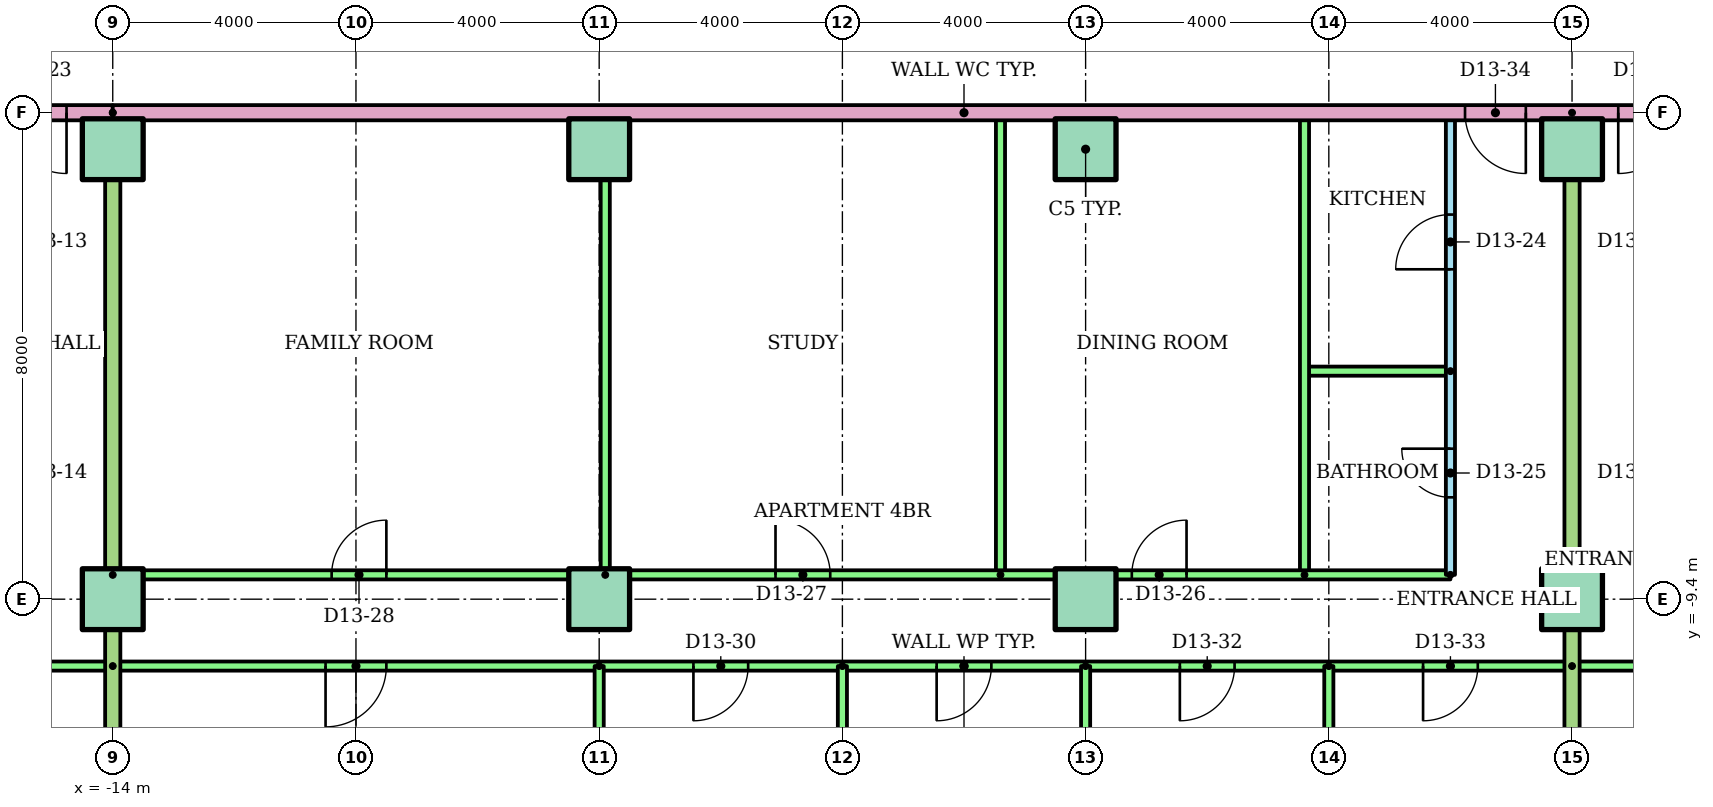
"""IFC4 building model, lengths in metres.
Left out: names, types, materials, properties, quantities, classifications, styles, units other than length and angle.
Written with IfcOpenShell. Run it as: python <this file> out.ifc"""

import sys

from ifc_helpers import new_model, si_unit, direction, frame, frame_2d, origin, origin_2d, place, context, subcontext, project, spatial, rectangle, extrude, element, fill, save


model = new_model("IFC4")
c1 = context("Model", 3, precision=1e-05, world=origin(), true_north=direction((0.0, 1.0)))
c2 = subcontext(c1, "Body", "Model", "MODEL_VIEW")
j1 = project(units=[si_unit("LENGTHUNIT", "METRE"), si_unit("PLANEANGLEUNIT", "RADIAN")], contexts=[c1])
p1 = place(None, origin())
s1 = spatial("IfcSite", under=j1, at=p1, CompositionType="ELEMENT")
p2 = place(p1, origin())
s2 = spatial("IfcBuilding", under=s1, at=p2, CompositionType="ELEMENT")
p3 = place(p2, frame((0.0, 0.0, 51.2)))
s3 = spatial("IfcBuildingStorey", under=s2, at=p3, CompositionType="ELEMENT", Elevation=51.2)
for number, where in (
    (1, (-14.0, -9.4, 0.0)),
    (2, (-6.0, -9.4, 0.0)),
    (3, (2.0, -9.4, 0.0)),
    (4, (10.0, -9.4, 0.0)),
    (5, (-14.0, -2.0, 0.0)),
    (6, (-6.0, -2.0, 0.0)),
    (7, (2.0, -2.0, 0.0)),
    (8, (10.0, -2.0, 0.0)),
):
    element("IfcColumn", number, at=place(p3, frame(where)), inside=s3, PredefinedType="COLUMN", context=c2, shape_type="SweptSolid", body=[
        extrude(rectangle(XDim=1.0, YDim=1.0, at=origin_2d()), origin(), (0.0, 0.0, 1.0), 3.2),
    ])
p4 = place(p3, frame((-14.0, -10.5, 0.0), z_axis=(0.0, 0.0, 1.0), x_axis=(-1.0, 0.0, 0.0)))
e9 = element("IfcWall", 9, at=p4, inside=s3, PredefinedType="PARTITIONING", context=c2, shape_type="SweptSolid", body=[
    extrude(rectangle(XDim=22.52, YDim=0.15, at=frame_2d((11.26, 0.0))), origin(), (0.0, 0.0, 1.0), 2.4),
])
p5 = place(p4, frame((19.6, 0.0, 0.0)))
e10 = element("IfcOpeningElement", 10, at=p5, cuts=e9, PredefinedType="OPENING", context=c2, shape_type="SweptSolid", body=[
    extrude(rectangle(XDim=0.9, YDim=2.1, at=frame_2d((0.45, 1.05))), frame((0.0, 0.085, 0.0), z_axis=(0.0, -1.0, 0.0), x_axis=(1.0, 0.0, 0.0)), (0.0, 0.0, 1.0), 0.17),
])
p6 = place(p4, frame((14.14, 0.0, 0.0)))
e11 = element("IfcOpeningElement", 11, at=p6, cuts=e9, PredefinedType="OPENING", context=c2, shape_type="SweptSolid", body=[
    extrude(rectangle(XDim=0.9, YDim=2.1, at=frame_2d((0.45, 1.05))), frame((0.0, 0.085, 0.0), z_axis=(0.0, -1.0, 0.0), x_axis=(1.0, 0.0, 0.0)), (0.0, 0.0, 1.0), 0.17),
])
p7 = place(p4, frame((9.55, 0.0, 0.0)))
e12 = element("IfcOpeningElement", 12, at=p7, cuts=e9, PredefinedType="OPENING", context=c2, shape_type="SweptSolid", body=[
    extrude(rectangle(XDim=0.9, YDim=2.1, at=frame_2d((0.45, 1.05))), frame((0.0, 0.085, 0.0), z_axis=(0.0, -1.0, 0.0), x_axis=(1.0, 0.0, 0.0)), (0.0, 0.0, 1.0), 0.17),
])
p8 = place(p4, frame((3.5, 0.0, 0.0)))
e13 = element("IfcOpeningElement", 13, at=p8, cuts=e9, PredefinedType="OPENING", context=c2, shape_type="SweptSolid", body=[
    extrude(rectangle(XDim=1.0, YDim=2.1, at=frame_2d((0.5, 1.05))), frame((0.0, 0.085, 0.0), z_axis=(0.0, -1.0, 0.0), x_axis=(1.0, 0.0, 0.0)), (0.0, 0.0, 1.0), 0.17),
])
p9 = place(p3, frame((8.0, -9.0, 0.0), z_axis=(0.0, 0.0, 1.0), x_axis=(0.0, 1.0, 0.0)))
e14 = element("IfcWall", 14, at=p9, inside=s3, PredefinedType="PARTITIONING", context=c2, shape_type="SweptSolid", body=[
    extrude(rectangle(XDim=7.6, YDim=0.15, at=frame_2d((3.8, 0.0))), origin(), (0.0, 0.0, 1.0), 2.4),
])
p10 = place(p9, frame((5.025, 0.0, 0.0)))
e15 = element("IfcOpeningElement", 15, at=p10, cuts=e14, PredefinedType="OPENING", context=c2, shape_type="SweptSolid", body=[
    extrude(rectangle(XDim=0.9, YDim=2.1, at=frame_2d((0.45, 1.05))), frame((0.0, 0.085, 0.0), z_axis=(0.0, -1.0, 0.0), x_axis=(1.0, 0.0, 0.0)), (0.0, 0.0, 1.0), 0.17),
])
p11 = place(p9, frame((1.275, 0.0, 0.0)))
e16 = element("IfcOpeningElement", 16, at=p11, cuts=e14, PredefinedType="OPENING", context=c2, shape_type="SweptSolid", body=[
    extrude(rectangle(XDim=0.8, YDim=2.1, at=frame_2d((0.4, 1.05))), frame((0.0, 0.085, 0.0), z_axis=(0.0, -1.0, 0.0), x_axis=(1.0, 0.0, 0.0)), (0.0, 0.0, 1.0), 0.17),
])
p12 = place(p3, frame((8.0, -5.65, 0.0), z_axis=(0.0, 0.0, 1.0), x_axis=(-1.0, 0.0, 0.0)))
e17 = element("IfcWall", 17, at=p12, inside=s3, PredefinedType="PARTITIONING", context=c2, shape_type="SweptSolid", body=[
    extrude(rectangle(XDim=2.4, YDim=0.15, at=frame_2d((1.2, 0.0))), origin(), (0.0, 0.0, 1.0), 2.4),
])
for number, where, z_axis, x_axis in (
    (18, (5.6, -9.0, 0.0), (0.0, 0.0, 1.0), (0.0, 1.0, 0.0)),
    (19, (0.6, -9.0, 0.0), (0.0, 0.0, 1.0), (0.0, 1.0, 0.0)),
    (20, (-5.9, -9.0, 0.0), (0.0, 0.0, 1.0), (0.0, 1.0, 0.0)),
):
    element("IfcWall", number, at=place(p3, frame(where, z_axis=z_axis, x_axis=x_axis)), inside=s3, PredefinedType="PARTITIONING", context=c2, shape_type="SweptSolid", body=[
        extrude(rectangle(XDim=7.6, YDim=0.15, at=frame_2d((3.8, 0.0))), origin(), (0.0, 0.0, 1.0), 2.4),
    ])
p13 = place(p3, frame((-14.0, -9.0, 0.0)))
e21 = element("IfcWall", 21, at=p13, inside=s3, PredefinedType="PARTITIONING", context=c2, shape_type="SweptSolid", body=[
    extrude(rectangle(XDim=22.0, YDim=0.15, at=frame_2d((11.0, 0.0))), origin(), (0.0, 0.0, 1.0), 2.4),
])
p14 = place(p13, frame((16.76, 0.0, 0.0)))
e22 = element("IfcOpeningElement", 22, at=p14, cuts=e21, PredefinedType="OPENING", context=c2, shape_type="SweptSolid", body=[
    extrude(rectangle(XDim=0.9, YDim=2.1, at=frame_2d((0.45, 1.05))), frame((0.0, 0.085, 0.0), z_axis=(0.0, -1.0, 0.0), x_axis=(1.0, 0.0, 0.0)), (0.0, 0.0, 1.0), 0.17),
])
p15 = place(p13, frame((10.9, 0.0, 0.0)))
e23 = element("IfcOpeningElement", 23, at=p15, cuts=e21, PredefinedType="OPENING", context=c2, shape_type="SweptSolid", body=[
    extrude(rectangle(XDim=0.9, YDim=2.1, at=frame_2d((0.45, 1.05))), frame((0.0, 0.085, 0.0), z_axis=(0.0, -1.0, 0.0), x_axis=(1.0, 0.0, 0.0)), (0.0, 0.0, 1.0), 0.17),
])
p16 = place(p13, frame((3.6, 0.0, 0.0)))
e24 = element("IfcOpeningElement", 24, at=p16, cuts=e21, PredefinedType="OPENING", context=c2, shape_type="SweptSolid", body=[
    extrude(rectangle(XDim=0.9, YDim=2.1, at=frame_2d((0.45, 1.05))), frame((0.0, 0.085, 0.0), z_axis=(0.0, -1.0, 0.0), x_axis=(1.0, 0.0, 0.0)), (0.0, 0.0, 1.0), 0.17),
])
p17 = place(p3, frame((10.0, -10.5, 0.0), z_axis=(0.0, 0.0, 1.0), x_axis=(-1.0, 0.0, 0.0)))
e25 = element("IfcWall", 25, at=p17, inside=s3, PredefinedType="PARTITIONING", context=c2, shape_type="SweptSolid", body=[
    extrude(rectangle(XDim=24.0, YDim=0.15, at=frame_2d((12.0, 0.0))), origin(), (0.0, 0.0, 1.0), 2.4),
])
p18 = place(p17, frame((19.5, 0.0, 0.0)))
e26 = element("IfcOpeningElement", 26, at=p18, cuts=e25, PredefinedType="OPENING", context=c2, shape_type="SweptSolid", body=[
    extrude(rectangle(XDim=1.0, YDim=2.1, at=frame_2d((0.5, 1.05))), frame((0.0, 0.085, 0.0), z_axis=(0.0, -1.0, 0.0), x_axis=(1.0, 0.0, 0.0)), (0.0, 0.0, 1.0), 0.17),
])
p19 = place(p17, frame((13.55, 0.0, 0.0)))
e27 = element("IfcOpeningElement", 27, at=p19, cuts=e25, PredefinedType="OPENING", context=c2, shape_type="SweptSolid", body=[
    extrude(rectangle(XDim=0.9, YDim=2.1, at=frame_2d((0.45, 1.05))), frame((0.0, 0.085, 0.0), z_axis=(0.0, -1.0, 0.0), x_axis=(1.0, 0.0, 0.0)), (0.0, 0.0, 1.0), 0.17),
])
p20 = place(p17, frame((9.55, 0.0, 0.0)))
e28 = element("IfcOpeningElement", 28, at=p20, cuts=e25, PredefinedType="OPENING", context=c2, shape_type="SweptSolid", body=[
    extrude(rectangle(XDim=0.9, YDim=2.1, at=frame_2d((0.45, 1.05))), frame((0.0, 0.085, 0.0), z_axis=(0.0, -1.0, 0.0), x_axis=(1.0, 0.0, 0.0)), (0.0, 0.0, 1.0), 0.17),
])
p21 = place(p17, frame((5.55, 0.0, 0.0)))
e29 = element("IfcOpeningElement", 29, at=p21, cuts=e25, PredefinedType="OPENING", context=c2, shape_type="SweptSolid", body=[
    extrude(rectangle(XDim=0.9, YDim=2.1, at=frame_2d((0.45, 1.05))), frame((0.0, 0.085, 0.0), z_axis=(0.0, -1.0, 0.0), x_axis=(1.0, 0.0, 0.0)), (0.0, 0.0, 1.0), 0.17),
])
p22 = place(p17, frame((1.55, 0.0, 0.0)))
e30 = element("IfcOpeningElement", 30, at=p22, cuts=e25, PredefinedType="OPENING", context=c2, shape_type="SweptSolid", body=[
    extrude(rectangle(XDim=0.9, YDim=2.1, at=frame_2d((0.45, 1.05))), frame((0.0, 0.085, 0.0), z_axis=(0.0, -1.0, 0.0), x_axis=(1.0, 0.0, 0.0)), (0.0, 0.0, 1.0), 0.17),
])
p23 = place(p3, frame((-6.0, -10.5, 0.0), z_axis=(0.0, 0.0, 1.0), x_axis=(0.0, -1.0, 0.0)))
e31 = element("IfcWall", 31, at=p23, inside=s3, PredefinedType="PARTITIONING", context=c2, shape_type="SweptSolid", body=[
    extrude(rectangle(XDim=5.61, YDim=0.15, at=frame_2d((2.805, 0.0))), origin(), (0.0, 0.0, 1.0), 2.4),
])
p24 = place(p3, frame((-2.0, -10.5, 0.0), z_axis=(0.0, 0.0, 1.0), x_axis=(0.0, -1.0, 0.0)))
e32 = element("IfcWall", 32, at=p24, inside=s3, PredefinedType="PARTITIONING", context=c2, shape_type="SweptSolid", body=[
    extrude(rectangle(XDim=5.621, YDim=0.15, at=frame_2d((2.811, 0.0))), origin(), (0.0, 0.0, 1.0), 2.4),
])
p25 = place(p3, frame((2.0, -10.5, 0.0), z_axis=(0.0, 0.0, 1.0), x_axis=(0.0, -1.0, 0.0)))
e33 = element("IfcWall", 33, at=p25, inside=s3, PredefinedType="PARTITIONING", context=c2, shape_type="SweptSolid", body=[
    extrude(rectangle(XDim=5.61, YDim=0.15, at=frame_2d((2.805, 0.0))), origin(), (0.0, 0.0, 1.0), 2.4),
])
p26 = place(p3, frame((6.0, -10.5, 0.0), z_axis=(0.0, 0.0, 1.0), x_axis=(0.0, -1.0, 0.0)))
e34 = element("IfcWall", 34, at=p26, inside=s3, PredefinedType="PARTITIONING", context=c2, shape_type="SweptSolid", body=[
    extrude(rectangle(XDim=5.621, YDim=0.15, at=frame_2d((2.811, 0.0))), origin(), (0.0, 0.0, 1.0), 2.4),
])
p27 = place(p3, frame((-14.0, -1.4, 0.0), z_axis=(0.0, 0.0, 1.0), x_axis=(0.0, -1.0, 0.0)))
e35 = element("IfcWall", 35, at=p27, inside=s3, PredefinedType="PARTITIONING", context=c2, shape_type="SweptSolid", body=[
    extrude(rectangle(XDim=14.71, YDim=0.25, at=frame_2d((7.355, 0.0))), origin(), (0.0, 0.0, 1.0), 2.4),
])
p28 = place(p3, frame((36.52, -10.5, 0.0), z_axis=(0.0, 0.0, 1.0), x_axis=(-1.0, 0.0, 0.0)))
e36 = element("IfcWall", 36, at=p28, inside=s3, PredefinedType="PARTITIONING", context=c2, shape_type="SweptSolid", body=[
    extrude(rectangle(XDim=26.52, YDim=0.15, at=frame_2d((13.26, 0.0))), origin(), (0.0, 0.0, 1.0), 2.4),
])
p29 = place(p28, frame((22.02, 0.0, 0.0)))
e37 = element("IfcOpeningElement", 37, at=p29, cuts=e36, PredefinedType="OPENING", context=c2, shape_type="SweptSolid", body=[
    extrude(rectangle(XDim=1.0, YDim=2.1, at=frame_2d((0.5, 1.05))), frame((0.0, 0.085, 0.0), z_axis=(0.0, -1.0, 0.0), x_axis=(1.0, 0.0, 0.0)), (0.0, 0.0, 1.0), 0.17),
])
p30 = place(p28, frame((16.07, 0.0, 0.0)))
e38 = element("IfcOpeningElement", 38, at=p30, cuts=e36, PredefinedType="OPENING", context=c2, shape_type="SweptSolid", body=[
    extrude(rectangle(XDim=0.9, YDim=2.1, at=frame_2d((0.45, 1.05))), frame((0.0, 0.085, 0.0), z_axis=(0.0, -1.0, 0.0), x_axis=(1.0, 0.0, 0.0)), (0.0, 0.0, 1.0), 0.17),
])
p31 = place(p28, frame((12.07, 0.0, 0.0)))
e39 = element("IfcOpeningElement", 39, at=p31, cuts=e36, PredefinedType="OPENING", context=c2, shape_type="SweptSolid", body=[
    extrude(rectangle(XDim=0.9, YDim=2.1, at=frame_2d((0.45, 1.05))), frame((0.0, 0.085, 0.0), z_axis=(0.0, -1.0, 0.0), x_axis=(1.0, 0.0, 0.0)), (0.0, 0.0, 1.0), 0.17),
])
p32 = place(p28, frame((6.87, 0.0, 0.0)))
e40 = element("IfcOpeningElement", 40, at=p32, cuts=e36, PredefinedType="OPENING", context=c2, shape_type="SweptSolid", body=[
    extrude(rectangle(XDim=0.9, YDim=2.1, at=frame_2d((0.45, 1.05))), frame((0.0, 0.085, 0.0), z_axis=(0.0, -1.0, 0.0), x_axis=(1.0, 0.0, 0.0)), (0.0, 0.0, 1.0), 0.17),
])
p33 = place(p28, frame((0.86, 0.0, 0.0)))
e41 = element("IfcOpeningElement", 41, at=p33, cuts=e36, PredefinedType="OPENING", context=c2, shape_type="SweptSolid", body=[
    extrude(rectangle(XDim=0.9, YDim=2.1, at=frame_2d((0.45, 1.05))), frame((0.0, 0.085, 0.0), z_axis=(0.0, -1.0, 0.0), x_axis=(1.0, 0.0, 0.0)), (0.0, 0.0, 1.0), 0.17),
])
p34 = place(p3, frame((10.0, -1.4, 0.0), z_axis=(0.0, 0.0, 1.0), x_axis=(0.0, -1.0, 0.0)))
e42 = element("IfcWall", 42, at=p34, inside=s3, PredefinedType="PARTITIONING", context=c2, shape_type="SweptSolid", body=[
    extrude(rectangle(XDim=14.71, YDim=0.25, at=frame_2d((7.355, 0.0))), origin(), (0.0, 0.0, 1.0), 2.4),
])
p35 = place(p3, frame((-14.0, -1.4, 0.0), z_axis=(0.0, 0.0, 1.0), x_axis=(-1.0, 0.0, 0.0)))
e43 = element("IfcWall", 43, at=p35, inside=s3, PredefinedType="PARTITIONING", context=c2, shape_type="SweptSolid", body=[
    extrude(rectangle(XDim=15.0, YDim=0.25, at=frame_2d((7.5, 0.0))), origin(), (0.0, 0.0, 1.0), 2.4),
])
p36 = place(p35, frame((0.76, 0.0, 0.0)))
e44 = element("IfcOpeningElement", 44, at=p36, cuts=e43, PredefinedType="OPENING", context=c2, shape_type="SweptSolid", body=[
    extrude(rectangle(XDim=1.0, YDim=2.1, at=frame_2d((0.5, 1.05))), frame((0.0, 0.135, 0.0), z_axis=(0.0, -1.0, 0.0), x_axis=(1.0, 0.0, 0.0)), (0.0, 0.0, 1.0), 0.27),
])
p37 = place(p3, frame((14.0, -1.4, 0.0), z_axis=(0.0, 0.0, 1.0), x_axis=(-1.0, 0.0, 0.0)))
e45 = element("IfcWall", 45, at=p37, inside=s3, PredefinedType="PARTITIONING", context=c2, shape_type="SweptSolid", body=[
    extrude(rectangle(XDim=28.0, YDim=0.25, at=frame_2d((14.0, 0.0))), origin(), (0.0, 0.0, 1.0), 2.4),
])
p38 = place(p37, frame((4.76, 0.0, 0.0)))
e46 = element("IfcOpeningElement", 46, at=p38, cuts=e45, PredefinedType="OPENING", context=c2, shape_type="SweptSolid", body=[
    extrude(rectangle(XDim=1.0, YDim=2.1, at=frame_2d((0.5, 1.05))), frame((0.0, 0.135, 0.0), z_axis=(0.0, -1.0, 0.0), x_axis=(1.0, 0.0, 0.0)), (0.0, 0.0, 1.0), 0.27),
])
p39 = place(p37, frame((2.24, 0.0, 0.0)))
e47 = element("IfcOpeningElement", 47, at=p39, cuts=e45, PredefinedType="OPENING", context=c2, shape_type="SweptSolid", body=[
    extrude(rectangle(XDim=1.0, YDim=2.1, at=frame_2d((0.5, 1.05))), frame((0.0, 0.135, 0.0), z_axis=(0.0, -1.0, 0.0), x_axis=(1.0, 0.0, 0.0)), (0.0, 0.0, 1.0), 0.27),
])
p40 = place(p36, origin())
e48 = element("IfcDoor", 48, at=p40, inside=s3, OperationType="SINGLE_SWING_LEFT", PredefinedType="DOOR", context=c2, shape_type="SweptSolid", body=[
    extrude(rectangle(XDim=1.0, YDim=2.1, at=frame_2d((0.5, 1.05))), frame((0.0, 0.025, 0.0), z_axis=(0.0, -1.0, 0.0), x_axis=(1.0, 0.0, 0.0)), (0.0, 0.0, 1.0), 0.05),
])
fill(e44, e48)
p41 = place(p10, origin())
e49 = element("IfcDoor", 49, at=p41, inside=s3, OperationType="SINGLE_SWING_LEFT", PredefinedType="DOOR", context=c2, shape_type="SweptSolid", body=[
    extrude(rectangle(XDim=0.9, YDim=2.1, at=frame_2d((0.45, 1.05))), frame((0.0, 0.025, 0.0), z_axis=(0.0, -1.0, 0.0), x_axis=(1.0, 0.0, 0.0)), (0.0, 0.0, 1.0), 0.05),
])
fill(e15, e49)
p42 = place(p11, origin())
e50 = element("IfcDoor", 50, at=p42, inside=s3, OperationType="SINGLE_SWING_RIGHT", PredefinedType="DOOR", context=c2, shape_type="SweptSolid", body=[
    extrude(rectangle(XDim=0.8, YDim=2.1, at=frame_2d((0.4, 1.05))), frame((0.0, 0.025, 0.0), z_axis=(0.0, -1.0, 0.0), x_axis=(1.0, 0.0, 0.0)), (0.0, 0.0, 1.0), 0.05),
])
fill(e16, e50)
p43 = place(p14, origin())
e51 = element("IfcDoor", 51, at=p43, inside=s3, OperationType="SINGLE_SWING_RIGHT", PredefinedType="DOOR", context=c2, shape_type="SweptSolid", body=[
    extrude(rectangle(XDim=0.9, YDim=2.1, at=frame_2d((0.45, 1.05))), frame((0.0, 0.025, 0.0), z_axis=(0.0, -1.0, 0.0), x_axis=(1.0, 0.0, 0.0)), (0.0, 0.0, 1.0), 0.05),
])
fill(e22, e51)
p44 = place(p15, origin())
e52 = element("IfcDoor", 52, at=p44, inside=s3, OperationType="SINGLE_SWING_LEFT", PredefinedType="DOOR", context=c2, shape_type="SweptSolid", body=[
    extrude(rectangle(XDim=0.9, YDim=2.1, at=frame_2d((0.45, 1.05))), frame((0.0, 0.025, 0.0), z_axis=(0.0, -1.0, 0.0), x_axis=(1.0, 0.0, 0.0)), (0.0, 0.0, 1.0), 0.05),
])
fill(e23, e52)
p45 = place(p16, origin())
e53 = element("IfcDoor", 53, at=p45, inside=s3, OperationType="SINGLE_SWING_RIGHT", PredefinedType="DOOR", context=c2, shape_type="SweptSolid", body=[
    extrude(rectangle(XDim=0.9, YDim=2.1, at=frame_2d((0.45, 1.05))), frame((0.0, 0.025, 0.0), z_axis=(0.0, -1.0, 0.0), x_axis=(1.0, 0.0, 0.0)), (0.0, 0.0, 1.0), 0.05),
])
fill(e24, e53)
p46 = place(p18, origin())
e54 = element("IfcDoor", 54, at=p46, inside=s3, OperationType="SINGLE_SWING_RIGHT", PredefinedType="DOOR", context=c2, shape_type="SweptSolid", body=[
    extrude(rectangle(XDim=1.0, YDim=2.1, at=frame_2d((0.5, 1.05))), frame((0.0, 0.025, 0.0), z_axis=(0.0, -1.0, 0.0), x_axis=(1.0, 0.0, 0.0)), (0.0, 0.0, 1.0), 0.05),
])
fill(e26, e54)
p47 = place(p19, origin())
e55 = element("IfcDoor", 55, at=p47, inside=s3, OperationType="SINGLE_SWING_RIGHT", PredefinedType="DOOR", context=c2, shape_type="SweptSolid", body=[
    extrude(rectangle(XDim=0.9, YDim=2.1, at=frame_2d((0.45, 1.05))), frame((0.0, 0.025, 0.0), z_axis=(0.0, -1.0, 0.0), x_axis=(1.0, 0.0, 0.0)), (0.0, 0.0, 1.0), 0.05),
])
fill(e27, e55)
p48 = place(p20, origin())
e56 = element("IfcDoor", 56, at=p48, inside=s3, OperationType="SINGLE_SWING_RIGHT", PredefinedType="DOOR", context=c2, shape_type="SweptSolid", body=[
    extrude(rectangle(XDim=0.9, YDim=2.1, at=frame_2d((0.45, 1.05))), frame((0.0, 0.025, 0.0), z_axis=(0.0, -1.0, 0.0), x_axis=(1.0, 0.0, 0.0)), (0.0, 0.0, 1.0), 0.05),
])
fill(e28, e56)
p49 = place(p21, origin())
e57 = element("IfcDoor", 57, at=p49, inside=s3, OperationType="SINGLE_SWING_RIGHT", PredefinedType="DOOR", context=c2, shape_type="SweptSolid", body=[
    extrude(rectangle(XDim=0.9, YDim=2.1, at=frame_2d((0.45, 1.05))), frame((0.0, 0.025, 0.0), z_axis=(0.0, -1.0, 0.0), x_axis=(1.0, 0.0, 0.0)), (0.0, 0.0, 1.0), 0.05),
])
fill(e29, e57)
p50 = place(p22, origin())
e58 = element("IfcDoor", 58, at=p50, inside=s3, OperationType="SINGLE_SWING_RIGHT", PredefinedType="DOOR", context=c2, shape_type="SweptSolid", body=[
    extrude(rectangle(XDim=0.9, YDim=2.1, at=frame_2d((0.45, 1.05))), frame((0.0, 0.025, 0.0), z_axis=(0.0, -1.0, 0.0), x_axis=(1.0, 0.0, 0.0)), (0.0, 0.0, 1.0), 0.05),
])
fill(e30, e58)
p51 = place(p38, origin())
e59 = element("IfcDoor", 59, at=p51, inside=s3, OperationType="SINGLE_SWING_LEFT", PredefinedType="DOOR", context=c2, shape_type="SweptSolid", body=[
    extrude(rectangle(XDim=1.0, YDim=2.1, at=frame_2d((0.5, 1.05))), frame((0.0, 0.025, 0.0), z_axis=(0.0, -1.0, 0.0), x_axis=(1.0, 0.0, 0.0)), (0.0, 0.0, 1.0), 0.05),
])
fill(e46, e59)
p52 = place(p39, origin())
e60 = element("IfcDoor", 60, at=p52, inside=s3, OperationType="SINGLE_SWING_RIGHT", PredefinedType="DOOR", context=c2, shape_type="SweptSolid", body=[
    extrude(rectangle(XDim=1.0, YDim=2.1, at=frame_2d((0.5, 1.05))), frame((0.0, 0.025, 0.0), z_axis=(0.0, -1.0, 0.0), x_axis=(1.0, 0.0, 0.0)), (0.0, 0.0, 1.0), 0.05),
])
fill(e47, e60)
save(model, sys.argv[1])
